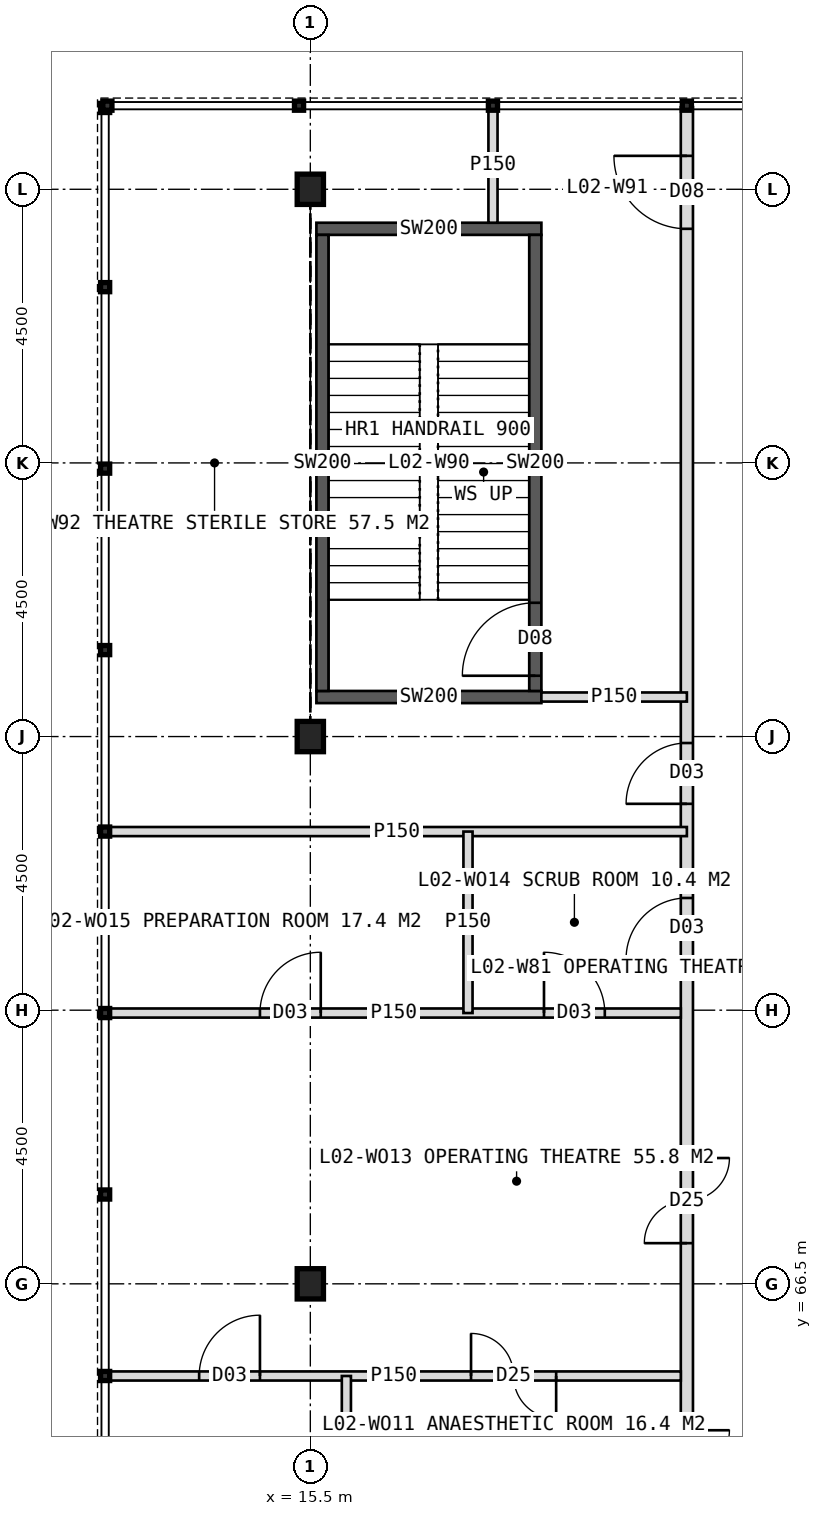
"""IFC4 building model, lengths in metres.
Left out: names, types, materials, properties, quantities, classifications, styles, units other than length and angle.
Written with IfcOpenShell. Run it as: python <this file> out.ifc"""

import sys

from ifc_helpers import new_model, si_unit, direction, frame, frame_2d, origin, origin_2d, place, context, subcontext, project, spatial, rectangle, i_section, extrude, element, fill, save


model = new_model("IFC4")
c1 = context("Model", 3, precision=1e-05, world=origin(), true_north=direction((0.0, 1.0)))
c2 = subcontext(c1, "Body", "Model", "MODEL_VIEW")
j1 = project(units=[si_unit("LENGTHUNIT", "METRE"), si_unit("PLANEANGLEUNIT", "RADIAN")], contexts=[c1])
p1 = place(None, origin())
s1 = spatial("IfcSite", under=j1, at=p1, CompositionType="ELEMENT")
p2 = place(p1, origin())
s2 = spatial("IfcBuilding", under=s1, at=p2, CompositionType="ELEMENT")
p3 = place(p2, frame((0.0, 0.0, 11.0)))
s3 = spatial("IfcBuildingStorey", under=s2, at=p3, CompositionType="ELEMENT", Elevation=11.0)
for number, where, z_axis, x_axis in (
    (1, (15.5, 66.5, 0.0), (0.0, 0.0, 1.0), (1.0, 0.0, 0.0)),
    (2, (15.5, 75.5, 0.0), (0.0, 0.0, 1.0), (1.0, 0.0, 0.0)),
    (3, (15.5, 84.5, 0.0), (0.0, 0.0, 1.0), (1.0, 0.0, 0.0)),
):
    element("IfcColumn", number, at=place(p3, frame(where, z_axis=z_axis, x_axis=x_axis)), inside=s3, PredefinedType="COLUMN", context=c2, shape_type="SweptSolid", body=[
        extrude(i_section(OverallWidth=0.432, OverallDepth=0.498, WebThickness=0.056, FlangeThickness=0.089, FilletRadius=0.015, at=origin_2d()), origin(), (0.0, 0.0, 1.0), 5.5),
    ])
p4 = place(p3, frame((21.693, 38.15, 0.0), z_axis=(0.0, 0.0, 1.0), x_axis=(0.0, 1.0, 0.0)))
e4 = element("IfcWall", 4, at=p4, inside=s3, PredefinedType="PARTITIONING", context=c2, shape_type="SweptSolid", body=[
    extrude(rectangle(XDim=47.7, YDim=0.2, at=frame_2d((23.85, 0.0))), origin(), (0.0, 0.0, 1.0), 5.2),
])
p5 = place(p4, frame((45.7, 0.0, 0.0)))
e5 = element("IfcOpeningElement", 5, at=p5, cuts=e4, PredefinedType="OPENING", context=c2, shape_type="SweptSolid", body=[
    extrude(rectangle(XDim=1.2, YDim=2.1, at=frame_2d((0.6, 1.05))), frame((0.0, 0.11, 0.0), z_axis=(0.0, -1.0, 0.0), x_axis=(1.0, 0.0, 0.0)), (0.0, 0.0, 1.0), 0.22),
])
p6 = place(p4, frame((36.244, 0.0, 0.0)))
e6 = element("IfcOpeningElement", 6, at=p6, cuts=e4, PredefinedType="OPENING", context=c2, shape_type="SweptSolid", body=[
    extrude(rectangle(XDim=1.0, YDim=2.1, at=frame_2d((0.5, 1.05))), frame((0.0, 0.11, 0.0), z_axis=(0.0, -1.0, 0.0), x_axis=(1.0, 0.0, 0.0)), (0.0, 0.0, 1.0), 0.22),
])
p7 = place(p4, frame((0.73, 0.0, 0.0)))
e7 = element("IfcOpeningElement", 7, at=p7, cuts=e4, PredefinedType="OPENING", context=c2, shape_type="SweptSolid", body=[
    extrude(rectangle(XDim=1.4, YDim=2.2, at=frame_2d((0.7, 1.1))), frame((0.0, 0.11, 0.0), z_axis=(0.0, -1.0, 0.0), x_axis=(1.0, 0.0, 0.0)), (0.0, 0.0, 1.0), 0.22),
])
p8 = place(p4, frame((5.144, 0.0, 0.0)))
e8 = element("IfcOpeningElement", 8, at=p8, cuts=e4, PredefinedType="OPENING", context=c2, shape_type="SweptSolid", body=[
    extrude(rectangle(XDim=1.4, YDim=2.2, at=frame_2d((0.7, 1.1))), frame((0.0, 0.11, 0.0), z_axis=(0.0, -1.0, 0.0), x_axis=(1.0, 0.0, 0.0)), (0.0, 0.0, 1.0), 0.22),
])
p9 = place(p4, frame((9.82, 0.0, 0.0)))
e9 = element("IfcOpeningElement", 9, at=p9, cuts=e4, PredefinedType="OPENING", context=c2, shape_type="SweptSolid", body=[
    extrude(rectangle(XDim=1.0, YDim=2.1, at=frame_2d((0.5, 1.05))), frame((0.0, 0.11, 0.0), z_axis=(0.0, -1.0, 0.0), x_axis=(1.0, 0.0, 0.0)), (0.0, 0.0, 1.0), 0.22),
])
p10 = place(p4, frame((12.605, 0.0, 0.0)))
e10 = element("IfcOpeningElement", 10, at=p10, cuts=e4, PredefinedType="OPENING", context=c2, shape_type="SweptSolid", body=[
    extrude(rectangle(XDim=1.4, YDim=2.2, at=frame_2d((0.7, 1.1))), frame((0.0, 0.11, 0.0), z_axis=(0.0, -1.0, 0.0), x_axis=(1.0, 0.0, 0.0)), (0.0, 0.0, 1.0), 0.22),
])
p11 = place(p4, frame((17.081, 0.0, 0.0)))
e11 = element("IfcOpeningElement", 11, at=p11, cuts=e4, PredefinedType="OPENING", context=c2, shape_type="SweptSolid", body=[
    extrude(rectangle(XDim=1.4, YDim=2.2, at=frame_2d((0.7, 1.1))), frame((0.0, 0.11, 0.0), z_axis=(0.0, -1.0, 0.0), x_axis=(1.0, 0.0, 0.0)), (0.0, 0.0, 1.0), 0.22),
])
p12 = place(p4, frame((21.758, 0.0, 0.0)))
e12 = element("IfcOpeningElement", 12, at=p12, cuts=e4, PredefinedType="OPENING", context=c2, shape_type="SweptSolid", body=[
    extrude(rectangle(XDim=1.0, YDim=2.1, at=frame_2d((0.5, 1.05))), frame((0.0, 0.11, 0.0), z_axis=(0.0, -1.0, 0.0), x_axis=(1.0, 0.0, 0.0)), (0.0, 0.0, 1.0), 0.22),
])
p13 = place(p4, frame((24.542, 0.0, 0.0)))
e13 = element("IfcOpeningElement", 13, at=p13, cuts=e4, PredefinedType="OPENING", context=c2, shape_type="SweptSolid", body=[
    extrude(rectangle(XDim=1.4, YDim=2.2, at=frame_2d((0.7, 1.1))), frame((0.0, 0.11, 0.0), z_axis=(0.0, -1.0, 0.0), x_axis=(1.0, 0.0, 0.0)), (0.0, 0.0, 1.0), 0.22),
])
p14 = place(p4, frame((29.019, 0.0, 0.0)))
e14 = element("IfcOpeningElement", 14, at=p14, cuts=e4, PredefinedType="OPENING", context=c2, shape_type="SweptSolid", body=[
    extrude(rectangle(XDim=1.4, YDim=2.2, at=frame_2d((0.7, 1.1))), frame((0.0, 0.11, 0.0), z_axis=(0.0, -1.0, 0.0), x_axis=(1.0, 0.0, 0.0)), (0.0, 0.0, 1.0), 0.22),
])
p15 = place(p4, frame((33.695, 0.0, 0.0)))
e15 = element("IfcOpeningElement", 15, at=p15, cuts=e4, PredefinedType="OPENING", context=c2, shape_type="SweptSolid", body=[
    extrude(rectangle(XDim=1.0, YDim=2.1, at=frame_2d((0.5, 1.05))), frame((0.0, 0.11, 0.0), z_axis=(0.0, -1.0, 0.0), x_axis=(1.0, 0.0, 0.0)), (0.0, 0.0, 1.0), 0.22),
])
for number, where, z_axis, x_axis in (
    (16, (15.6, 76.15, 0.0), (0.0, 0.0, 1.0), (1.0, 0.0, 0.0)),
    (17, (15.6, 83.85, 0.0), (0.0, 0.0, 1.0), (1.0, 0.0, 0.0)),
):
    element("IfcWall", number, at=place(p3, frame(where, z_axis=z_axis, x_axis=x_axis)), inside=s3, PredefinedType="SOLIDWALL", context=c2, shape_type="SweptSolid", body=[
        extrude(rectangle(XDim=3.7, YDim=0.2, at=frame_2d((1.85, 0.0))), origin(), (0.0, 0.0, 1.0), 5.2),
    ])
p16 = place(p3, frame((15.7, 76.25, 0.0), z_axis=(0.0, 0.0, 1.0), x_axis=(0.0, 1.0, 0.0)))
e18 = element("IfcWall", 18, at=p16, inside=s3, PredefinedType="SOLIDWALL", context=c2, shape_type="SweptSolid", body=[
    extrude(rectangle(XDim=7.5, YDim=0.2, at=frame_2d((3.75, 0.0))), origin(), (0.0, 0.0, 1.0), 5.2),
])
p17 = place(p3, frame((19.2, 76.25, 0.0), z_axis=(0.0, 0.0, 1.0), x_axis=(0.0, 1.0, 0.0)))
e19 = element("IfcWall", 19, at=p17, inside=s3, PredefinedType="SOLIDWALL", context=c2, shape_type="SweptSolid", body=[
    extrude(rectangle(XDim=7.5, YDim=0.2, at=frame_2d((3.75, 0.0))), origin(), (0.0, 0.0, 1.0), 5.2),
])
p18 = place(p17, frame((0.25, 0.0, 0.0)))
e20 = element("IfcOpeningElement", 20, at=p18, cuts=e19, PredefinedType="OPENING", context=c2, shape_type="SweptSolid", body=[
    extrude(rectangle(XDim=1.2, YDim=2.1, at=frame_2d((0.6, 1.05))), frame((0.0, 0.11, 0.0), z_axis=(0.0, -1.0, 0.0), x_axis=(1.0, 0.0, 0.0)), (0.0, 0.0, 1.0), 0.22),
])
p19 = place(p3, frame((19.3, 76.15, 0.0), z_axis=(0.0, 0.0, 1.0), x_axis=(1.0, 0.0, 0.0)))
e21 = element("IfcWall", 21, at=p19, inside=s3, PredefinedType="PARTITIONING", context=c2, shape_type="SweptSolid", body=[
    extrude(rectangle(XDim=2.393, YDim=0.15, at=frame_2d((1.197, 0.0))), origin(), (0.0, 0.0, 1.0), 5.2),
])
p20 = place(p3, frame((18.504, 83.95, 0.0), z_axis=(0.0, 0.0, 1.0), x_axis=(0.0, 1.0, 0.0)))
e22 = element("IfcWall", 22, at=p20, inside=s3, PredefinedType="PARTITIONING", context=c2, shape_type="SweptSolid", body=[
    extrude(rectangle(XDim=1.9, YDim=0.15, at=frame_2d((0.95, 0.0))), origin(), (0.0, 0.0, 1.0), 5.2),
])
p21 = place(p3, frame((12.15, 73.938, 0.0), z_axis=(0.0, 0.0, 1.0), x_axis=(1.0, 0.0, 0.0)))
e23 = element("IfcWall", 23, at=p21, inside=s3, PredefinedType="PARTITIONING", context=c2, shape_type="SweptSolid", body=[
    extrude(rectangle(XDim=9.543, YDim=0.15, at=frame_2d((4.771, 0.0))), origin(), (0.0, 0.0, 1.0), 5.2),
])
p22 = place(p3, frame((12.15, 64.984, 0.0), z_axis=(0.0, 0.0, 1.0), x_axis=(1.0, 0.0, 0.0)))
e24 = element("IfcWall", 24, at=p22, inside=s3, PredefinedType="PARTITIONING", context=c2, shape_type="SweptSolid", body=[
    extrude(rectangle(XDim=9.443, YDim=0.15, at=frame_2d((4.722, 0.0))), origin(), (0.0, 0.0, 1.0), 5.2),
])
p23 = place(p22, frame((5.993, 0.0, 0.0)))
e25 = element("IfcOpeningElement", 25, at=p23, cuts=e24, PredefinedType="OPENING", context=c2, shape_type="SweptSolid", body=[
    extrude(rectangle(XDim=1.4, YDim=2.2, at=frame_2d((0.7, 1.1))), frame((0.0, 0.085, 0.0), z_axis=(0.0, -1.0, 0.0), x_axis=(1.0, 0.0, 0.0)), (0.0, 0.0, 1.0), 0.17),
])
p24 = place(p22, frame((1.521, 0.0, 0.0)))
e26 = element("IfcOpeningElement", 26, at=p24, cuts=e24, PredefinedType="OPENING", context=c2, shape_type="SweptSolid", body=[
    extrude(rectangle(XDim=1.0, YDim=2.1, at=frame_2d((0.5, 1.05))), frame((0.0, 0.085, 0.0), z_axis=(0.0, -1.0, 0.0), x_axis=(1.0, 0.0, 0.0)), (0.0, 0.0, 1.0), 0.17),
])
p25 = place(p3, frame((12.15, 70.953, 0.0), z_axis=(0.0, 0.0, 1.0), x_axis=(1.0, 0.0, 0.0)))
e27 = element("IfcWall", 27, at=p25, inside=s3, PredefinedType="PARTITIONING", context=c2, shape_type="SweptSolid", body=[
    extrude(rectangle(XDim=9.443, YDim=0.15, at=frame_2d((4.722, 0.0))), origin(), (0.0, 0.0, 1.0), 5.2),
])
p26 = place(p25, frame((7.193, 0.0, 0.0)))
e28 = element("IfcOpeningElement", 28, at=p26, cuts=e27, PredefinedType="OPENING", context=c2, shape_type="SweptSolid", body=[
    extrude(rectangle(XDim=1.0, YDim=2.1, at=frame_2d((0.5, 1.05))), frame((0.0, 0.085, 0.0), z_axis=(0.0, -1.0, 0.0), x_axis=(1.0, 0.0, 0.0)), (0.0, 0.0, 1.0), 0.17),
])
p27 = place(p25, frame((2.521, 0.0, 0.0)))
e29 = element("IfcOpeningElement", 29, at=p27, cuts=e27, PredefinedType="OPENING", context=c2, shape_type="SweptSolid", body=[
    extrude(rectangle(XDim=1.0, YDim=2.1, at=frame_2d((0.5, 1.05))), frame((0.0, 0.085, 0.0), z_axis=(0.0, -1.0, 0.0), x_axis=(1.0, 0.0, 0.0)), (0.0, 0.0, 1.0), 0.17),
])
for number, where, z_axis, x_axis in (
    (30, (16.093, 62.0, 0.0), (0.0, 0.0, 1.0), (0.0, 1.0, 0.0)),
    (31, (18.093, 70.953, 0.0), (0.0, 0.0, 1.0), (0.0, 1.0, 0.0)),
):
    element("IfcWall", number, at=place(p3, frame(where, z_axis=z_axis, x_axis=x_axis)), inside=s3, PredefinedType="PARTITIONING", context=c2, shape_type="SweptSolid", body=[
        extrude(rectangle(XDim=2.984, YDim=0.15, at=frame_2d((1.492, 0.0))), origin(), (0.0, 0.0, 1.0), 5.2),
    ])
p28 = place(p18, origin())
e32 = element("IfcDoor", 32, at=p28, inside=s3, OperationType="SINGLE_SWING_LEFT", PredefinedType="DOOR", context=c2, shape_type="SweptSolid", body=[
    extrude(rectangle(XDim=1.2, YDim=2.1, at=frame_2d((0.6, 1.05))), frame((0.0, 0.025, 0.0), z_axis=(0.0, -1.0, 0.0), x_axis=(1.0, 0.0, 0.0)), (0.0, 0.0, 1.0), 0.05),
])
fill(e20, e32)
p29 = place(p5, origin())
e33 = element("IfcDoor", 33, at=p29, inside=s3, OperationType="SINGLE_SWING_RIGHT", PredefinedType="DOOR", context=c2, shape_type="SweptSolid", body=[
    extrude(rectangle(XDim=1.2, YDim=2.1, at=frame_2d((0.6, 1.05))), frame((0.0, 0.025, 0.0), z_axis=(0.0, -1.0, 0.0), x_axis=(1.0, 0.0, 0.0)), (0.0, 0.0, 1.0), 0.05),
])
fill(e5, e33)
p30 = place(p6, origin())
e34 = element("IfcDoor", 34, at=p30, inside=s3, OperationType="SINGLE_SWING_LEFT", PredefinedType="DOOR", context=c2, shape_type="SweptSolid", body=[
    extrude(rectangle(XDim=1.0, YDim=2.1, at=frame_2d((0.5, 1.05))), frame((0.0, 0.025, 0.0), z_axis=(0.0, -1.0, 0.0), x_axis=(1.0, 0.0, 0.0)), (0.0, 0.0, 1.0), 0.05),
])
fill(e6, e34)
p31 = place(p13, origin())
e35 = element("IfcDoor", 35, at=p31, inside=s3, OperationType="DOUBLE_DOOR_SINGLE_SWING", PredefinedType="DOOR", context=c2, shape_type="SweptSolid", body=[
    extrude(rectangle(XDim=1.4, YDim=2.2, at=frame_2d((0.7, 1.1))), frame((0.0, 0.025, 0.0), z_axis=(0.0, -1.0, 0.0), x_axis=(1.0, 0.0, 0.0)), (0.0, 0.0, 1.0), 0.05),
])
fill(e13, e35)
p32 = place(p23, origin())
e36 = element("IfcDoor", 36, at=p32, inside=s3, OperationType="DOUBLE_DOOR_SINGLE_SWING", PredefinedType="DOOR", context=c2, shape_type="SweptSolid", body=[
    extrude(rectangle(XDim=1.4, YDim=2.2, at=frame_2d((0.7, 1.1))), frame((0.0, 0.025, 0.0), z_axis=(0.0, -1.0, 0.0), x_axis=(1.0, 0.0, 0.0)), (0.0, 0.0, 1.0), 0.05),
])
fill(e25, e36)
p33 = place(p24, origin())
e37 = element("IfcDoor", 37, at=p33, inside=s3, OperationType="SINGLE_SWING_RIGHT", PredefinedType="DOOR", context=c2, shape_type="SweptSolid", body=[
    extrude(rectangle(XDim=1.0, YDim=2.1, at=frame_2d((0.5, 1.05))), frame((0.0, 0.025, 0.0), z_axis=(0.0, -1.0, 0.0), x_axis=(1.0, 0.0, 0.0)), (0.0, 0.0, 1.0), 0.05),
])
fill(e26, e37)
p34 = place(p14, origin())
e38 = element("IfcDoor", 38, at=p34, inside=s3, OperationType="DOUBLE_DOOR_SINGLE_SWING", PredefinedType="DOOR", context=c2, shape_type="SweptSolid", body=[
    extrude(rectangle(XDim=1.4, YDim=2.2, at=frame_2d((0.7, 1.1))), frame((0.0, 0.025, 0.0), z_axis=(0.0, -1.0, 0.0), x_axis=(1.0, 0.0, 0.0)), (0.0, 0.0, 1.0), 0.05),
])
fill(e14, e38)
p35 = place(p15, origin())
e39 = element("IfcDoor", 39, at=p35, inside=s3, OperationType="SINGLE_SWING_LEFT", PredefinedType="DOOR", context=c2, shape_type="SweptSolid", body=[
    extrude(rectangle(XDim=1.0, YDim=2.1, at=frame_2d((0.5, 1.05))), frame((0.0, 0.025, 0.0), z_axis=(0.0, -1.0, 0.0), x_axis=(1.0, 0.0, 0.0)), (0.0, 0.0, 1.0), 0.05),
])
fill(e15, e39)
p36 = place(p26, origin())
e40 = element("IfcDoor", 40, at=p36, inside=s3, OperationType="SINGLE_SWING_LEFT", PredefinedType="DOOR", context=c2, shape_type="SweptSolid", body=[
    extrude(rectangle(XDim=1.0, YDim=2.1, at=frame_2d((0.5, 1.05))), frame((0.0, 0.025, 0.0), z_axis=(0.0, -1.0, 0.0), x_axis=(1.0, 0.0, 0.0)), (0.0, 0.0, 1.0), 0.05),
])
fill(e28, e40)
p37 = place(p27, origin())
e41 = element("IfcDoor", 41, at=p37, inside=s3, OperationType="SINGLE_SWING_RIGHT", PredefinedType="DOOR", context=c2, shape_type="SweptSolid", body=[
    extrude(rectangle(XDim=1.0, YDim=2.1, at=frame_2d((0.5, 1.05))), frame((0.0, 0.025, 0.0), z_axis=(0.0, -1.0, 0.0), x_axis=(1.0, 0.0, 0.0)), (0.0, 0.0, 1.0), 0.05),
])
fill(e29, e41)
save(model, sys.argv[1])
